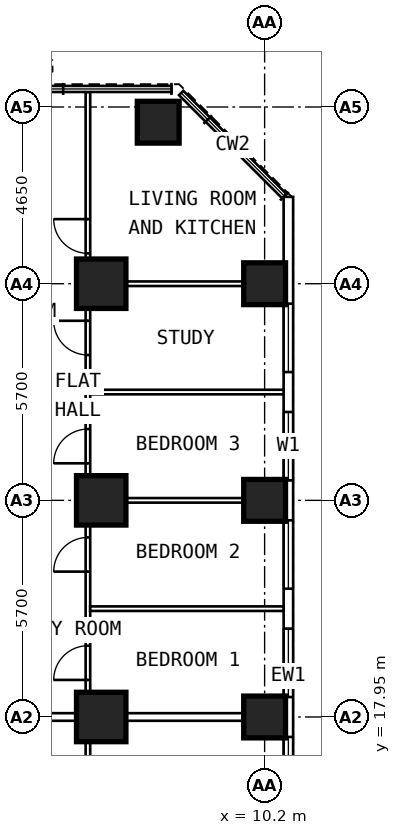
"""IFC4 building model, lengths in metres.
Left out: names, types, materials, properties, quantities, classifications, styles, units other than length and angle.
Written with IfcOpenShell. Run it as: python <this file> out.ifc"""

import sys

from ifc_helpers import new_model, si_unit, direction, frame, frame_2d, origin, origin_2d, place, context, subcontext, project, spatial, rectangle, extrude, element, fill, save


model = new_model("IFC4")
c1 = context("Model", 3, precision=1e-05, world=origin(), true_north=direction((0.0, 1.0)))
c2 = subcontext(c1, "Body", "Model", "MODEL_VIEW")
j1 = project(units=[si_unit("LENGTHUNIT", "METRE"), si_unit("PLANEANGLEUNIT", "RADIAN")], contexts=[c1])
p1 = place(None, origin())
s1 = spatial("IfcSite", under=j1, at=p1, CompositionType="ELEMENT")
p2 = place(p1, origin())
s2 = spatial("IfcBuilding", under=s1, at=p2, CompositionType="ELEMENT")
p3 = place(p2, frame((0.0, 0.0, 39.4)))
s3 = spatial("IfcBuildingStorey", under=s2, at=p3, CompositionType="ELEMENT", Elevation=39.4)
for number, where, z_axis, x_axis in (
    (1, (10.2, 17.95, 0.0), (0.0, 0.0, 1.0), (0.0, 1.0, 0.0)),
    (2, (10.2, 23.65, 0.0), (0.0, 0.0, 1.0), (0.0, 1.0, 0.0)),
    (3, (10.2, 29.35, 0.0), (0.0, 0.0, 1.0), (0.0, 1.0, 0.0)),
    (4, (7.4, 33.6, 0.0), (0.0, 0.0, 1.0), (0.0, 1.0, 0.0)),
):
    element("IfcColumn", number, at=place(p3, frame(where, z_axis=z_axis, x_axis=x_axis)), inside=s3, PredefinedType="COLUMN", context=c2, shape_type="SweptSolid", body=[
        extrude(rectangle(XDim=1.1, YDim=1.1, at=origin_2d()), origin(), (0.0, 0.0, 1.0), 3.6),
    ])
for number, where, z_axis, x_axis in (
    (5, (5.9, 17.95, 0.0), (0.0, 0.0, 1.0), (0.0, 1.0, 0.0)),
    (6, (5.9, 23.65, 0.0), (0.0, 0.0, 1.0), (0.0, 1.0, 0.0)),
    (7, (5.9, 29.35, 0.0), (0.0, 0.0, 1.0), (0.0, 1.0, 0.0)),
):
    element("IfcColumn", number, at=place(p3, frame(where, z_axis=z_axis, x_axis=x_axis)), inside=s3, PredefinedType="COLUMN", context=c2, shape_type="SweptSolid", body=[
        extrude(rectangle(XDim=1.3, YDim=1.3, at=origin_2d()), origin(), (0.0, 0.0, 1.0), 3.6),
    ])
p4 = place(p3, frame((10.825, 6.409, 0.0), z_axis=(0.0, 0.0, 1.0), x_axis=(0.0, 1.0, 0.0)))
e8 = element("IfcWall", 8, at=p4, inside=s3, PredefinedType="SOLIDWALL", context=c2, shape_type="SweptSolid", body=[
    extrude(rectangle(XDim=25.226, YDim=0.25, at=frame_2d((12.613, 0.0))), origin(), (0.0, 0.0, 1.0), 3.35),
])
p5 = place(p4, frame((0.666, 0.0, 0.8)))
e9 = element("IfcOpeningElement", 9, at=p5, cuts=e8, PredefinedType="OPENING", context=c2, shape_type="SweptSolid", body=[
    extrude(rectangle(XDim=1.8, YDim=1.8, at=frame_2d((0.9, 0.9))), frame((0.0, 0.137, 0.0), z_axis=(0.0, -1.0, 0.0), x_axis=(1.0, 0.0, 0.0)), (0.0, 0.0, 1.0), 0.274),
])
p6 = place(p4, frame((3.516, 0.0, 0.8)))
e10 = element("IfcOpeningElement", 10, at=p6, cuts=e8, PredefinedType="OPENING", context=c2, shape_type="SweptSolid", body=[
    extrude(rectangle(XDim=1.8, YDim=1.8, at=frame_2d((0.9, 0.9))), frame((0.0, 0.137, 0.0), z_axis=(0.0, -1.0, 0.0), x_axis=(1.0, 0.0, 0.0)), (0.0, 0.0, 1.0), 0.274),
])
p7 = place(p4, frame((6.366, 0.0, 0.8)))
e11 = element("IfcOpeningElement", 11, at=p7, cuts=e8, PredefinedType="OPENING", context=c2, shape_type="SweptSolid", body=[
    extrude(rectangle(XDim=1.8, YDim=1.8, at=frame_2d((0.9, 0.9))), frame((0.0, 0.137, 0.0), z_axis=(0.0, -1.0, 0.0), x_axis=(1.0, 0.0, 0.0)), (0.0, 0.0, 1.0), 0.274),
])
p8 = place(p4, frame((9.216, 0.0, 0.8)))
e12 = element("IfcOpeningElement", 12, at=p8, cuts=e8, PredefinedType="OPENING", context=c2, shape_type="SweptSolid", body=[
    extrude(rectangle(XDim=1.8, YDim=1.8, at=frame_2d((0.9, 0.9))), frame((0.0, 0.137, 0.0), z_axis=(0.0, -1.0, 0.0), x_axis=(1.0, 0.0, 0.0)), (0.0, 0.0, 1.0), 0.274),
])
p9 = place(p4, frame((12.066, 0.0, 0.8)))
e13 = element("IfcOpeningElement", 13, at=p9, cuts=e8, PredefinedType="OPENING", context=c2, shape_type="SweptSolid", body=[
    extrude(rectangle(XDim=1.8, YDim=1.8, at=frame_2d((0.9, 0.9))), frame((0.0, 0.137, 0.0), z_axis=(0.0, -1.0, 0.0), x_axis=(1.0, 0.0, 0.0)), (0.0, 0.0, 1.0), 0.274),
])
p10 = place(p4, frame((14.916, 0.0, 0.8)))
e14 = element("IfcOpeningElement", 14, at=p10, cuts=e8, PredefinedType="OPENING", context=c2, shape_type="SweptSolid", body=[
    extrude(rectangle(XDim=1.8, YDim=1.8, at=frame_2d((0.9, 0.9))), frame((0.0, 0.137, 0.0), z_axis=(0.0, -1.0, 0.0), x_axis=(1.0, 0.0, 0.0)), (0.0, 0.0, 1.0), 0.274),
])
p11 = place(p4, frame((17.766, 0.0, 0.8)))
e15 = element("IfcOpeningElement", 15, at=p11, cuts=e8, PredefinedType="OPENING", context=c2, shape_type="SweptSolid", body=[
    extrude(rectangle(XDim=1.8, YDim=1.8, at=frame_2d((0.9, 0.9))), frame((0.0, 0.137, 0.0), z_axis=(0.0, -1.0, 0.0), x_axis=(1.0, 0.0, 0.0)), (0.0, 0.0, 1.0), 0.274),
])
p12 = place(p4, frame((20.616, 0.0, 0.8)))
e16 = element("IfcOpeningElement", 16, at=p12, cuts=e8, PredefinedType="OPENING", context=c2, shape_type="SweptSolid", body=[
    extrude(rectangle(XDim=1.8, YDim=1.8, at=frame_2d((0.9, 0.9))), frame((0.0, 0.137, 0.0), z_axis=(0.0, -1.0, 0.0), x_axis=(1.0, 0.0, 0.0)), (0.0, 0.0, 1.0), 0.274),
])
p13 = place(p3, frame((5.55, 9.691, 0.0), z_axis=(0.0, 0.0, 1.0), x_axis=(0.0, 1.0, 0.0)))
e17 = element("IfcWall", 17, at=p13, inside=s3, PredefinedType="PARTITIONING", context=c2, shape_type="SweptSolid", body=[
    extrude(rectangle(XDim=8.009, YDim=0.12, at=frame_2d((4.004, 0.0))), origin(), (0.0, 0.0, 1.0), 3.35),
])
p14 = place(p13, frame((4.959, 0.0, 0.0)))
e18 = element("IfcOpeningElement", 18, at=p14, cuts=e17, PredefinedType="OPENING", context=c2, shape_type="SweptSolid", body=[
    extrude(rectangle(XDim=0.9, YDim=2.1, at=frame_2d((0.45, 1.05))), frame((0.0, 0.072, 0.0), z_axis=(0.0, -1.0, 0.0), x_axis=(1.0, 0.0, 0.0)), (0.0, 0.0, 1.0), 0.144),
])
p15 = place(p3, frame((5.55, 18.05, 0.0), z_axis=(0.0, 0.0, 1.0), x_axis=(0.0, 1.0, 0.0)))
e19 = element("IfcWall", 19, at=p15, inside=s3, PredefinedType="PARTITIONING", context=c2, shape_type="SweptSolid", body=[
    extrude(rectangle(XDim=16.345, YDim=0.12, at=frame_2d((8.172, 0.0))), origin(), (0.0, 0.0, 1.0), 3.35),
])
p16 = place(p15, frame((0.875, 0.0, 0.0)))
e20 = element("IfcOpeningElement", 20, at=p16, cuts=e19, PredefinedType="OPENING", context=c2, shape_type="SweptSolid", body=[
    extrude(rectangle(XDim=0.9, YDim=2.1, at=frame_2d((0.45, 1.05))), frame((0.0, 0.072, 0.0), z_axis=(0.0, -1.0, 0.0), x_axis=(1.0, 0.0, 0.0)), (0.0, 0.0, 1.0), 0.144),
])
p17 = place(p15, frame((3.725, 0.0, 0.0)))
e21 = element("IfcOpeningElement", 21, at=p17, cuts=e19, PredefinedType="OPENING", context=c2, shape_type="SweptSolid", body=[
    extrude(rectangle(XDim=0.9, YDim=2.1, at=frame_2d((0.45, 1.05))), frame((0.0, 0.072, 0.0), z_axis=(0.0, -1.0, 0.0), x_axis=(1.0, 0.0, 0.0)), (0.0, 0.0, 1.0), 0.144),
])
p18 = place(p15, frame((6.575, 0.0, 0.0)))
e22 = element("IfcOpeningElement", 22, at=p18, cuts=e19, PredefinedType="OPENING", context=c2, shape_type="SweptSolid", body=[
    extrude(rectangle(XDim=0.9, YDim=2.1, at=frame_2d((0.45, 1.05))), frame((0.0, 0.072, 0.0), z_axis=(0.0, -1.0, 0.0), x_axis=(1.0, 0.0, 0.0)), (0.0, 0.0, 1.0), 0.144),
])
p19 = place(p15, frame((9.425, 0.0, 0.0)))
e23 = element("IfcOpeningElement", 23, at=p19, cuts=e19, PredefinedType="OPENING", context=c2, shape_type="SweptSolid", body=[
    extrude(rectangle(XDim=0.9, YDim=2.1, at=frame_2d((0.45, 1.05))), frame((0.0, 0.072, 0.0), z_axis=(0.0, -1.0, 0.0), x_axis=(1.0, 0.0, 0.0)), (0.0, 0.0, 1.0), 0.144),
])
p20 = place(p15, frame((12.1, 0.0, 0.0)))
e24 = element("IfcOpeningElement", 24, at=p20, cuts=e19, PredefinedType="OPENING", context=c2, shape_type="SweptSolid", body=[
    extrude(rectangle(XDim=0.9, YDim=2.1, at=frame_2d((0.45, 1.05))), frame((0.0, 0.072, 0.0), z_axis=(0.0, -1.0, 0.0), x_axis=(1.0, 0.0, 0.0)), (0.0, 0.0, 1.0), 0.144),
])
p21 = place(p3, frame((5.61, 20.8, 0.0), z_axis=(0.0, 0.0, 1.0), x_axis=(1.0, 0.0, 0.0)))
e25 = element("IfcWall", 25, at=p21, inside=s3, PredefinedType="PARTITIONING", context=c2, shape_type="SweptSolid", body=[
    extrude(rectangle(XDim=5.09, YDim=0.12, at=frame_2d((2.545, 0.0))), origin(), (0.0, 0.0, 1.0), 3.35),
])
p22 = place(p3, frame((5.61, 23.65, 0.0), z_axis=(0.0, 0.0, 1.0), x_axis=(1.0, 0.0, 0.0)))
e26 = element("IfcWall", 26, at=p22, inside=s3, PredefinedType="PARTITIONING", context=c2, shape_type="SweptSolid", body=[
    extrude(rectangle(XDim=5.09, YDim=0.12, at=frame_2d((2.545, 0.0))), origin(), (0.0, 0.0, 1.0), 2.45),
])
p23 = place(p3, frame((5.61, 26.5, 0.0), z_axis=(0.0, 0.0, 1.0), x_axis=(1.0, 0.0, 0.0)))
e27 = element("IfcWall", 27, at=p23, inside=s3, PredefinedType="PARTITIONING", context=c2, shape_type="SweptSolid", body=[
    extrude(rectangle(XDim=5.09, YDim=0.12, at=frame_2d((2.545, 0.0))), origin(), (0.0, 0.0, 1.0), 3.35),
])
p24 = place(p3, frame((5.61, 29.35, 0.0), z_axis=(0.0, 0.0, 1.0), x_axis=(1.0, 0.0, 0.0)))
e28 = element("IfcWall", 28, at=p24, inside=s3, PredefinedType="PARTITIONING", context=c2, shape_type="SweptSolid", body=[
    extrude(rectangle(XDim=5.09, YDim=0.12, at=frame_2d((2.545, 0.0))), origin(), (0.0, 0.0, 1.0), 2.45),
])
p25 = place(p3, frame((2.1, 17.95, 0.0), z_axis=(0.0, 0.0, 1.0), x_axis=(1.0, 0.0, 0.0)))
e29 = element("IfcWall", 29, at=p25, inside=s3, PredefinedType="PARTITIONING", context=c2, shape_type="SweptSolid", body=[
    extrude(rectangle(XDim=8.6, YDim=0.2, at=frame_2d((4.3, 0.0))), origin(), (0.0, 0.0, 1.0), 2.45),
])
p26 = place(p8, origin())
e30 = element("IfcWindow", 30, at=p26, inside=s3, PartitioningType="SINGLE_PANEL", PredefinedType="WINDOW", context=c2, shape_type="SweptSolid", body=[
    extrude(rectangle(XDim=1.8, YDim=1.8, at=frame_2d((0.9, 0.9))), frame((0.0, 0.03, 0.0), z_axis=(0.0, -1.0, 0.0), x_axis=(1.0, 0.0, 0.0)), (0.0, 0.0, 1.0), 0.06),
])
fill(e12, e30)
p27 = place(p9, origin())
e31 = element("IfcWindow", 31, at=p27, inside=s3, PartitioningType="SINGLE_PANEL", PredefinedType="WINDOW", context=c2, shape_type="SweptSolid", body=[
    extrude(rectangle(XDim=1.8, YDim=1.8, at=frame_2d((0.9, 0.9))), frame((0.0, 0.03, 0.0), z_axis=(0.0, -1.0, 0.0), x_axis=(1.0, 0.0, 0.0)), (0.0, 0.0, 1.0), 0.06),
])
fill(e13, e31)
p28 = place(p10, origin())
e32 = element("IfcWindow", 32, at=p28, inside=s3, PartitioningType="SINGLE_PANEL", PredefinedType="WINDOW", context=c2, shape_type="SweptSolid", body=[
    extrude(rectangle(XDim=1.8, YDim=1.8, at=frame_2d((0.9, 0.9))), frame((0.0, 0.03, 0.0), z_axis=(0.0, -1.0, 0.0), x_axis=(1.0, 0.0, 0.0)), (0.0, 0.0, 1.0), 0.06),
])
fill(e14, e32)
p29 = place(p11, origin())
e33 = element("IfcWindow", 33, at=p29, inside=s3, PartitioningType="SINGLE_PANEL", PredefinedType="WINDOW", context=c2, shape_type="SweptSolid", body=[
    extrude(rectangle(XDim=1.8, YDim=1.8, at=frame_2d((0.9, 0.9))), frame((0.0, 0.03, 0.0), z_axis=(0.0, -1.0, 0.0), x_axis=(1.0, 0.0, 0.0)), (0.0, 0.0, 1.0), 0.06),
])
fill(e15, e33)
p30 = place(p12, origin())
e34 = element("IfcWindow", 34, at=p30, inside=s3, PartitioningType="SINGLE_PANEL", PredefinedType="WINDOW", context=c2, shape_type="SweptSolid", body=[
    extrude(rectangle(XDim=1.8, YDim=1.8, at=frame_2d((0.9, 0.9))), frame((0.0, 0.03, 0.0), z_axis=(0.0, -1.0, 0.0), x_axis=(1.0, 0.0, 0.0)), (0.0, 0.0, 1.0), 0.06),
])
fill(e16, e34)
p31 = place(p16, origin())
e35 = element("IfcDoor", 35, at=p31, inside=s3, OperationType="SINGLE_SWING_LEFT", PredefinedType="DOOR", context=c2, shape_type="SweptSolid", body=[
    extrude(rectangle(XDim=0.9, YDim=2.1, at=frame_2d((0.45, 1.05))), frame((0.0, 0.025, 0.0), z_axis=(0.0, -1.0, 0.0), x_axis=(1.0, 0.0, 0.0)), (0.0, 0.0, 1.0), 0.05),
])
fill(e20, e35)
p32 = place(p17, origin())
e36 = element("IfcDoor", 36, at=p32, inside=s3, OperationType="SINGLE_SWING_LEFT", PredefinedType="DOOR", context=c2, shape_type="SweptSolid", body=[
    extrude(rectangle(XDim=0.9, YDim=2.1, at=frame_2d((0.45, 1.05))), frame((0.0, 0.025, 0.0), z_axis=(0.0, -1.0, 0.0), x_axis=(1.0, 0.0, 0.0)), (0.0, 0.0, 1.0), 0.05),
])
fill(e21, e36)
p33 = place(p18, origin())
e37 = element("IfcDoor", 37, at=p33, inside=s3, OperationType="SINGLE_SWING_LEFT", PredefinedType="DOOR", context=c2, shape_type="SweptSolid", body=[
    extrude(rectangle(XDim=0.9, YDim=2.1, at=frame_2d((0.45, 1.05))), frame((0.0, 0.025, 0.0), z_axis=(0.0, -1.0, 0.0), x_axis=(1.0, 0.0, 0.0)), (0.0, 0.0, 1.0), 0.05),
])
fill(e22, e37)
p34 = place(p19, origin())
e38 = element("IfcDoor", 38, at=p34, inside=s3, OperationType="SINGLE_SWING_RIGHT", PredefinedType="DOOR", context=c2, shape_type="SweptSolid", body=[
    extrude(rectangle(XDim=0.9, YDim=2.1, at=frame_2d((0.45, 1.05))), frame((0.0, 0.025, 0.0), z_axis=(0.0, -1.0, 0.0), x_axis=(1.0, 0.0, 0.0)), (0.0, 0.0, 1.0), 0.05),
])
fill(e23, e38)
p35 = place(p20, origin())
e39 = element("IfcDoor", 39, at=p35, inside=s3, OperationType="SINGLE_SWING_RIGHT", PredefinedType="DOOR", context=c2, shape_type="SweptSolid", body=[
    extrude(rectangle(XDim=0.9, YDim=2.1, at=frame_2d((0.45, 1.05))), frame((0.0, 0.025, 0.0), z_axis=(0.0, -1.0, 0.0), x_axis=(1.0, 0.0, 0.0)), (0.0, 0.0, 1.0), 0.05),
])
fill(e24, e39)
save(model, sys.argv[1])
